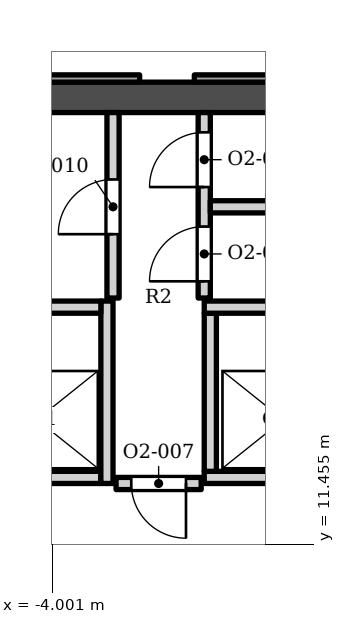
"""IFC4 building model, lengths in metres.
Left out: names, types, materials, properties, quantities, classifications, styles, units other than length and angle.
Written with IfcOpenShell. Run it as: python <this file> out.ifc"""

import sys

from ifc_helpers import new_model, si_unit, direction, frame, frame_2d, origin, place, context, subcontext, project, spatial, polyline, rectangle, outline, extrude, element, fill, save


model = new_model("IFC4")
c1 = context("Model", 3, precision=1e-05, world=origin(), true_north=direction((0.0, 1.0)))
c2 = subcontext(c1, "Body", "Model", "MODEL_VIEW")
j1 = project(units=[si_unit("LENGTHUNIT", "METRE"), si_unit("PLANEANGLEUNIT", "RADIAN")], contexts=[c1])
p1 = place(None, origin())
s1 = spatial("IfcSite", under=j1, at=p1, CompositionType="ELEMENT")
p2 = place(p1, origin())
s2 = spatial("IfcBuilding", under=s1, at=p2, CompositionType="ELEMENT")
p3 = place(p2, frame((0.0, 0.0, 156.3)))
s3 = spatial("IfcBuildingStorey", under=s2, at=p3, CompositionType="ELEMENT", Elevation=156.3)
p4 = place(p3, frame((-15.1, 18.802, 0.0), z_axis=(0.0, 0.0, 1.0), x_axis=(1.0, 0.0, 0.0)))
e1 = element("IfcWall", 1, at=p4, inside=s3, PredefinedType="SHEAR", context=c2, shape_type="SweptSolid", body=[
    extrude(rectangle(XDim=30.2, YDim=0.5, at=frame_2d((15.1, 0.0))), origin(), (0.0, 0.0, 1.0), 3.9),
])
p5 = place(p3, origin())
e2 = element("IfcWall", 2, at=p5, inside=s3, PredefinedType="SOLIDWALL", context=c2, shape_type="SweptSolid", body=[
    extrude(outline(polyline([(-1.663, 19.173), (-1.663, 19.052), (1.938, 19.052), (1.938, 19.173), (-1.663, 19.173)])), origin(), (0.0, 0.0, 1.0), 3.0),
])
p6 = place(p3, origin())
e3 = element("IfcWall", 3, at=p6, inside=s3, PredefinedType="ELEMENTEDWALL", context=c2, shape_type="SweptSolid", body=[
    extrude(outline(polyline([(-6.163, 19.173), (-6.163, 19.052), (-2.562, 19.052), (-2.562, 19.173), (-6.163, 19.173)])), origin(), (0.0, 0.0, 1.0), 3.0),
])
p7 = place(p3, frame((-2.95, 12.453, 0.0), z_axis=(0.0, 0.0, 1.0), x_axis=(1.0, 0.0, 0.0)))
e4 = element("IfcWall", 4, at=p7, inside=s3, PredefinedType="SOLIDWALL", context=c2, shape_type="SweptSolid", body=[
    extrude(rectangle(XDim=1.4, YDim=0.2, at=frame_2d((0.7, 0.0))), origin(), (0.0, 0.0, 1.0), 3.73),
])
p8 = place(p7, frame((0.25, 0.0, 0.0)))
e5 = element("IfcOpeningElement", 5, at=p8, cuts=e4, PredefinedType="OPENING", context=c2, shape_type="SweptSolid", body=[
    extrude(rectangle(XDim=0.9, YDim=2.1, at=frame_2d((0.45, 1.05))), frame((0.0, 0.11, 0.0), z_axis=(0.0, -1.0, 0.0), x_axis=(1.0, 0.0, 0.0)), (0.0, 0.0, 1.0), 0.22),
])
p9 = place(p3, frame((-5.3, 12.552, 0.0), z_axis=(0.0, 0.0, 1.0), x_axis=(1.0, 0.0, 0.0)))
e6 = element("IfcWall", 6, at=p9, inside=s3, PredefinedType="SOLIDWALL", context=c2, shape_type="SweptSolid", body=[
    extrude(rectangle(XDim=2.1, YDim=0.2, at=frame_2d((1.05, 0.0))), origin(), (0.0, 0.0, 1.0), 3.73),
])
p10 = place(p3, frame((-3.1, 12.453, 0.0), z_axis=(0.0, 0.0, 1.0), x_axis=(0.0, 1.0, 0.0)))
e7 = element("IfcWall", 7, at=p10, inside=s3, PredefinedType="SOLIDWALL", context=c2, shape_type="SweptSolid", body=[
    extrude(rectangle(XDim=3.0, YDim=0.2, at=frame_2d((1.5, 0.0))), origin(), (0.0, 0.0, 1.0), 3.73),
])
p11 = place(p3, frame((-1.5, 12.552, 0.0), z_axis=(0.0, 0.0, 1.0), x_axis=(1.0, 0.0, 0.0)))
e8 = element("IfcWall", 8, at=p11, inside=s3, PredefinedType="SOLIDWALL", context=c2, shape_type="SweptSolid", body=[
    extrude(rectangle(XDim=7.0, YDim=0.2, at=frame_2d((3.5, 0.0))), origin(), (0.0, 0.0, 1.0), 3.73),
])
p12 = place(p11, frame((3.075, 0.0, 0.0)))
e9 = element("IfcOpeningElement", 9, at=p12, cuts=e8, PredefinedType="OPENING", context=c2, shape_type="SweptSolid", body=[
    extrude(rectangle(XDim=1.1, YDim=2.1, at=frame_2d((0.55, 1.05))), frame((0.0, 0.11, 0.0), z_axis=(0.0, -1.0, 0.0), x_axis=(1.0, 0.0, 0.0)), (0.0, 0.0, 1.0), 0.22),
])
p13 = place(p11, frame((5.275, 0.0, 0.0)))
e10 = element("IfcOpeningElement", 10, at=p13, cuts=e8, PredefinedType="OPENING", context=c2, shape_type="SweptSolid", body=[
    extrude(rectangle(XDim=1.1, YDim=2.1, at=frame_2d((0.55, 1.05))), frame((0.0, 0.11, 0.0), z_axis=(0.0, -1.0, 0.0), x_axis=(1.0, 0.0, 0.0)), (0.0, 0.0, 1.0), 0.22),
])
p14 = place(p3, frame((-1.4, 12.653, 0.0), z_axis=(0.0, 0.0, 1.0), x_axis=(0.0, 1.0, 0.0)))
e11 = element("IfcWall", 11, at=p14, inside=s3, PredefinedType="SOLIDWALL", context=c2, shape_type="SweptSolid", body=[
    extrude(rectangle(XDim=2.6, YDim=0.2, at=frame_2d((1.3, 0.0))), origin(), (0.0, 0.0, 1.0), 3.73),
])
p15 = place(p3, frame((-5.3, 15.353, 0.0), z_axis=(0.0, 0.0, 1.0), x_axis=(1.0, 0.0, 0.0)))
e12 = element("IfcWall", 12, at=p15, inside=s3, PredefinedType="SOLIDWALL", context=c2, shape_type="SweptSolid", body=[
    extrude(rectangle(XDim=2.1, YDim=0.2, at=frame_2d((1.05, 0.0))), origin(), (0.0, 0.0, 1.0), 3.73),
])
p16 = place(p3, frame((-1.5, 15.353, 0.0), z_axis=(0.0, 0.0, 1.0), x_axis=(1.0, 0.0, 0.0)))
e13 = element("IfcWall", 13, at=p16, inside=s3, PredefinedType="SOLIDWALL", context=c2, shape_type="SweptSolid", body=[
    extrude(rectangle(XDim=7.2, YDim=0.2, at=frame_2d((3.6, 0.0))), origin(), (0.0, 0.0, 1.0), 3.73),
])
p17 = place(p3, frame((-3.0, 15.503, 0.0), z_axis=(0.0, 0.0, 1.0), x_axis=(0.0, 1.0, 0.0)))
e14 = element("IfcWall", 14, at=p17, inside=s3, PredefinedType="SOLIDWALL", context=c2, shape_type="SweptSolid", body=[
    extrude(rectangle(XDim=3.05, YDim=0.2, at=frame_2d((1.525, 0.0))), origin(), (0.0, 0.0, 1.0), 3.73),
])
p18 = place(p17, frame((1.05, 0.0, 0.0)))
e15 = element("IfcOpeningElement", 15, at=p18, cuts=e14, PredefinedType="OPENING", context=c2, shape_type="SweptSolid", body=[
    extrude(rectangle(XDim=0.9, YDim=2.1, at=frame_2d((0.45, 1.05))), frame((0.0, 0.11, 0.0), z_axis=(0.0, -1.0, 0.0), x_axis=(1.0, 0.0, 0.0)), (0.0, 0.0, 1.0), 0.22),
])
p19 = place(p3, frame((-1.5, 15.503, 0.0), z_axis=(0.0, 0.0, 1.0), x_axis=(0.0, 1.0, 0.0)))
e16 = element("IfcWall", 16, at=p19, inside=s3, PredefinedType="SOLIDWALL", context=c2, shape_type="SweptSolid", body=[
    extrude(rectangle(XDim=3.05, YDim=0.2, at=frame_2d((1.525, 0.0))), origin(), (0.0, 0.0, 1.0), 3.73),
])
p20 = place(p19, frame((0.275, 0.0, 0.0)))
e17 = element("IfcOpeningElement", 17, at=p20, cuts=e16, PredefinedType="OPENING", context=c2, shape_type="SweptSolid", body=[
    extrude(rectangle(XDim=0.9, YDim=2.1, at=frame_2d((0.45, 1.05))), frame((0.0, 0.11, 0.0), z_axis=(0.0, -1.0, 0.0), x_axis=(1.0, 0.0, 0.0)), (0.0, 0.0, 1.0), 0.22),
])
p21 = place(p19, frame((1.825, 0.0, 0.0)))
e18 = element("IfcOpeningElement", 18, at=p21, cuts=e16, PredefinedType="OPENING", context=c2, shape_type="SweptSolid", body=[
    extrude(rectangle(XDim=0.9, YDim=2.1, at=frame_2d((0.45, 1.05))), frame((0.0, 0.11, 0.0), z_axis=(0.0, -1.0, 0.0), x_axis=(1.0, 0.0, 0.0)), (0.0, 0.0, 1.0), 0.22),
])
p22 = place(p3, frame((-1.4, 17.003, 0.0), z_axis=(0.0, 0.0, 1.0), x_axis=(1.0, 0.0, 0.0)))
e19 = element("IfcWall", 19, at=p22, inside=s3, PredefinedType="SOLIDWALL", context=c2, shape_type="SweptSolid", body=[
    extrude(rectangle(XDim=6.85, YDim=0.2, at=frame_2d((3.425, 0.0))), origin(), (0.0, 0.0, 1.0), 3.73),
])
p23 = place(p8, origin())
e20 = element("IfcDoor", 20, at=p23, inside=s3, OperationType="SINGLE_SWING_RIGHT", PredefinedType="DOOR", context=c2, shape_type="SweptSolid", body=[
    extrude(rectangle(XDim=0.9, YDim=2.1, at=frame_2d((0.45, 1.05))), frame((0.0, 0.025, 0.0), z_axis=(0.0, -1.0, 0.0), x_axis=(1.0, 0.0, 0.0)), (0.0, 0.0, 1.0), 0.05),
])
fill(e5, e20)
p24 = place(p18, origin())
e21 = element("IfcDoor", 21, at=p24, inside=s3, OperationType="SINGLE_SWING_LEFT", PredefinedType="DOOR", context=c2, shape_type="SweptSolid", body=[
    extrude(rectangle(XDim=0.9, YDim=2.1, at=frame_2d((0.45, 1.05))), frame((0.0, 0.025, 0.0), z_axis=(0.0, -1.0, 0.0), x_axis=(1.0, 0.0, 0.0)), (0.0, 0.0, 1.0), 0.05),
])
fill(e15, e21)
p25 = place(p20, origin())
e22 = element("IfcDoor", 22, at=p25, inside=s3, OperationType="SINGLE_SWING_LEFT", PredefinedType="DOOR", context=c2, shape_type="SweptSolid", body=[
    extrude(rectangle(XDim=0.9, YDim=2.1, at=frame_2d((0.45, 1.05))), frame((0.0, 0.025, 0.0), z_axis=(0.0, -1.0, 0.0), x_axis=(1.0, 0.0, 0.0)), (0.0, 0.0, 1.0), 0.05),
])
fill(e17, e22)
p26 = place(p21, origin())
e23 = element("IfcDoor", 23, at=p26, inside=s3, OperationType="SINGLE_SWING_LEFT", PredefinedType="DOOR", context=c2, shape_type="SweptSolid", body=[
    extrude(rectangle(XDim=0.9, YDim=2.1, at=frame_2d((0.45, 1.05))), frame((0.0, 0.025, 0.0), z_axis=(0.0, -1.0, 0.0), x_axis=(1.0, 0.0, 0.0)), (0.0, 0.0, 1.0), 0.05),
])
fill(e18, e23)
save(model, sys.argv[1])
